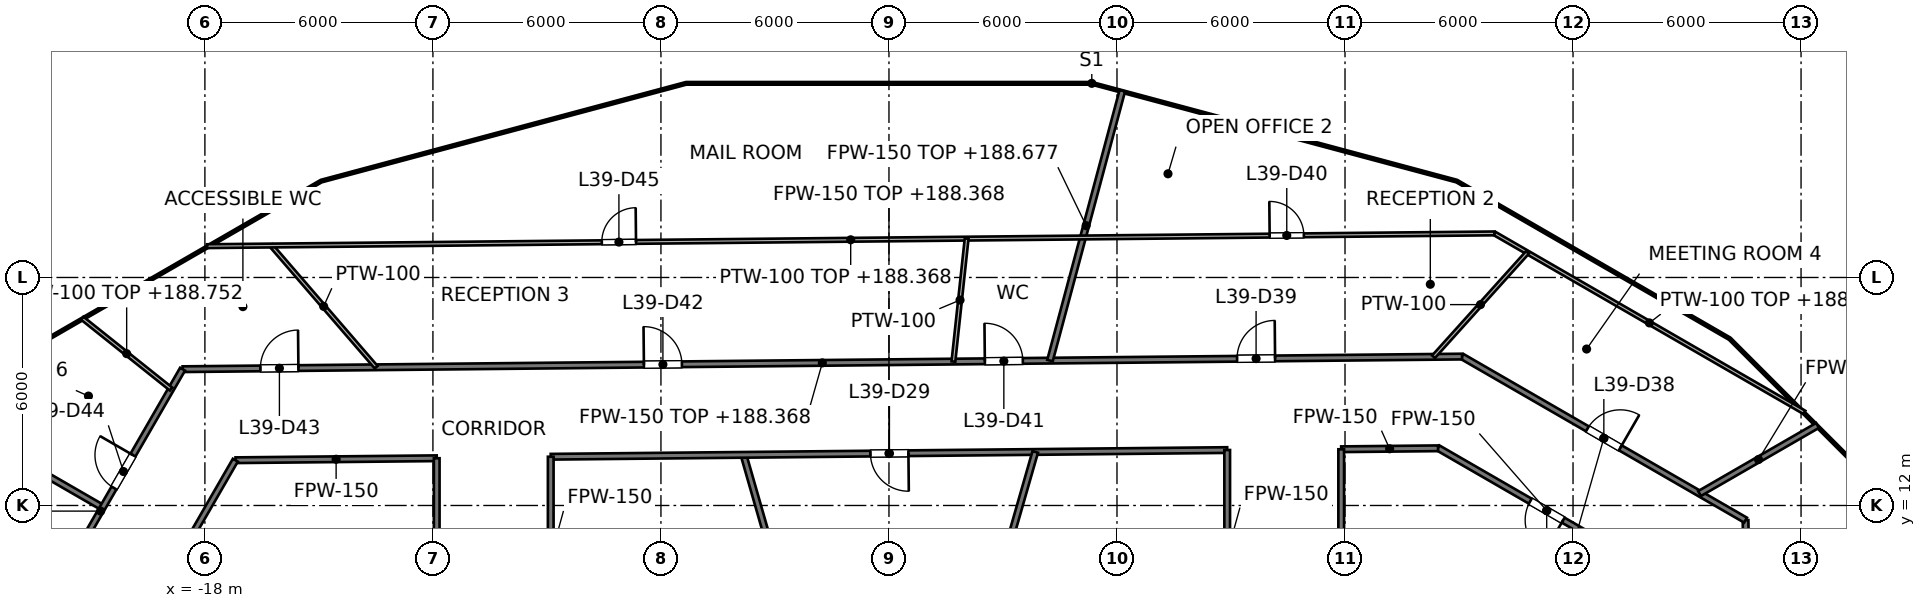
"""IFC4 building model, lengths in metres.
Left out: names, types, materials, properties, quantities, classifications, styles, units other than length and angle.
Written with IfcOpenShell. Run it as: python <this file> out.ifc"""

import sys

from ifc_helpers import new_model, si_unit, direction, frame, frame_2d, origin, place, context, subcontext, project, spatial, rectangle, extrude, element, fill, save


model = new_model("IFC4")
c1 = context("Model", 3, precision=1e-05, world=origin(), true_north=direction((0.0, 1.0)))
c2 = subcontext(c1, "Body", "Model", "MODEL_VIEW")
j1 = project(units=[si_unit("LENGTHUNIT", "METRE"), si_unit("PLANEANGLEUNIT", "RADIAN")], contexts=[c1])
p1 = place(None, origin())
s1 = spatial("IfcSite", under=j1, at=p1, CompositionType="ELEMENT")
p2 = place(p1, origin())
s2 = spatial("IfcBuilding", under=s1, at=p2, CompositionType="ELEMENT")
p3 = place(p2, frame((0.0, 0.0, 185.6)))
s3 = spatial("IfcBuildingStorey", under=s2, at=p3, CompositionType="ELEMENT", Elevation=185.6)
p4 = place(p3, frame((22.539, 11.615, 0.0), z_axis=(0.0, 0.0, 1.0), x_axis=(0.020626332176, -0.99978725458, 0.0)))
e1 = element("IfcWall", 1, at=p4, inside=s3, PredefinedType="PARTITIONING", context=c2, shape_type="SweptSolid", body=[
    extrude(rectangle(XDim=19.66, YDim=0.15, at=frame_2d((9.83, 0.0))), origin(), (0.0, 0.0, 1.0), 2.768),
])
p5 = place(p4, frame((9.33, 0.0, 0.0)))
e2 = element("IfcOpeningElement", 2, at=p5, cuts=e1, PredefinedType="OPENING", context=c2, shape_type="SweptSolid", body=[
    extrude(rectangle(XDim=1.0, YDim=2.1, at=frame_2d((0.5, 1.05))), frame((0.0, 0.075, 0.0), z_axis=(0.0, -1.0, 0.0), x_axis=(1.0, 0.0, 0.0)), (0.0, 0.0, 1.0), 0.15),
])
p6 = place(p3, frame((-3.827, 13.333, 0.0), z_axis=(0.0, 0.0, 1.0), x_axis=(0.275935525478, -0.961176147113, 0.0)))
e3 = element("IfcWall", 3, at=p6, inside=s3, PredefinedType="PARTITIONING", context=c2, shape_type="SweptSolid", body=[
    extrude(rectangle(XDim=5.548, YDim=0.15, at=frame_2d((2.774, 0.0))), origin(), (0.0, 0.0, 1.0), 3.7),
])
p7 = place(p3, frame((-24.433, 14.106, 0.0), z_axis=(0.0, 0.0, 1.0), x_axis=(0.866048255864, -0.499960416948, 0.0)))
e4 = element("IfcWall", 4, at=p7, inside=s3, PredefinedType="PARTITIONING", context=c2, shape_type="SweptSolid", body=[
    extrude(rectangle(XDim=4.322, YDim=0.15, at=frame_2d((2.161, 0.0))), origin(), (0.0, 0.0, 1.0), 2.845),
])
p8 = place(p3, frame((14.448, 13.515, 0.0), z_axis=(0.0, 0.0, 1.0), x_axis=(0.866032288321, -0.499988075443, 0.0)))
e5 = element("IfcWall", 5, at=p8, inside=s3, PredefinedType="PARTITIONING", context=c2, shape_type="SweptSolid", body=[
    extrude(rectangle(XDim=6.604, YDim=0.15, at=frame_2d((3.302, 0.0))), origin(), (0.0, 0.0, 1.0), 2.777),
])
p9 = place(p8, frame((2.802, 0.0, 0.0)))
e6 = element("IfcOpeningElement", 6, at=p9, cuts=e5, PredefinedType="OPENING", context=c2, shape_type="SweptSolid", body=[
    extrude(rectangle(XDim=1.0, YDim=2.1, at=frame_2d((0.5, 1.05))), frame((0.0, 0.075, 0.0), z_axis=(0.0, -1.0, 0.0), x_axis=(1.0, 0.0, 0.0)), (0.0, 0.0, 1.0), 0.15),
])
p10 = place(p3, frame((15.08, 15.921, 0.0), z_axis=(0.0, 0.0, 1.0), x_axis=(0.866020838546, -0.500007907142, 0.0)))
e7 = element("IfcWall", 7, at=p10, inside=s3, PredefinedType="PARTITIONING", context=c2, shape_type="SweptSolid", body=[
    extrude(rectangle(XDim=8.613, YDim=0.15, at=frame_2d((4.306, 0.0))), origin(), (0.0, 0.0, 1.0), 2.777),
])
p11 = place(p10, frame((3.808, 0.0, 0.0)))
e8 = element("IfcOpeningElement", 8, at=p11, cuts=e7, PredefinedType="OPENING", context=c2, shape_type="SweptSolid", body=[
    extrude(rectangle(XDim=1.0, YDim=2.1, at=frame_2d((0.5, 1.05))), frame((0.0, 0.075, 0.0), z_axis=(0.0, -1.0, 0.0), x_axis=(1.0, 0.0, 0.0)), (0.0, 0.0, 1.0), 0.15),
])
p12 = place(p3, frame((-17.194, 13.191, 0.0), z_axis=(0.0, 0.0, 1.0), x_axis=(0.999950853109, 0.009914200296, 0.0)))
e9 = element("IfcWall", 9, at=p12, inside=s3, PredefinedType="PARTITIONING", context=c2, shape_type="SweptSolid", body=[
    extrude(rectangle(XDim=5.294, YDim=0.15, at=frame_2d((2.647, 0.0))), origin(), (0.0, 0.0, 1.0), 2.777),
])
p13 = place(p3, frame((-8.9, 13.282, 0.0), z_axis=(0.0, 0.0, 1.0), x_axis=(0.999951241216, 0.009874977968, 0.0)))
e10 = element("IfcWall", 10, at=p13, inside=s3, PredefinedType="PARTITIONING", context=c2, shape_type="SweptSolid", body=[
    extrude(rectangle(XDim=17.801, YDim=0.15, at=frame_2d((8.9, 0.0))), origin(), (0.0, 0.0, 1.0), 2.768),
])
p14 = place(p13, frame((8.413, 0.0, 0.0)))
e11 = element("IfcOpeningElement", 11, at=p14, cuts=e10, PredefinedType="OPENING", context=c2, shape_type="SweptSolid", body=[
    extrude(rectangle(XDim=1.0, YDim=2.1, at=frame_2d((0.5, 1.05))), frame((0.0, 0.075, 0.0), z_axis=(0.0, -1.0, 0.0), x_axis=(1.0, 0.0, 0.0)), (0.0, 0.0, 1.0), 0.15),
])
p15 = place(p3, frame((11.9, 13.48, 0.0), z_axis=(0.0, 0.0, 1.0), x_axis=(0.999951307579, 0.009868255694, 0.0)))
e12 = element("IfcWall", 12, at=p15, inside=s3, PredefinedType="PARTITIONING", context=c2, shape_type="SweptSolid", body=[
    extrude(rectangle(XDim=2.548, YDim=0.15, at=frame_2d((1.274, 0.0))), origin(), (0.0, 0.0, 1.0), 2.777),
])
p16 = place(p3, frame((-18.587, 15.586, 0.0), z_axis=(0.0, 0.0, 1.0), x_axis=(0.999951300332, 0.009868989991, 0.0)))
e13 = element("IfcWall", 13, at=p16, inside=s3, PredefinedType="PARTITIONING", context=c2, shape_type="SweptSolid", body=[
    extrude(rectangle(XDim=33.669, YDim=0.15, at=frame_2d((16.834, 0.0))), origin(), (0.0, 0.0, 1.0), 2.768),
])
p17 = place(p16, frame((27.749, 0.0, 0.0)))
e14 = element("IfcOpeningElement", 14, at=p17, cuts=e13, PredefinedType="OPENING", context=c2, shape_type="SweptSolid", body=[
    extrude(rectangle(XDim=1.0, YDim=2.1, at=frame_2d((0.5, 1.05))), frame((0.0, 0.075, 0.0), z_axis=(0.0, -1.0, 0.0), x_axis=(1.0, 0.0, 0.0)), (0.0, 0.0, 1.0), 0.15),
])
p18 = place(p16, frame((21.111, 0.0, 0.0)))
e15 = element("IfcOpeningElement", 15, at=p18, cuts=e13, PredefinedType="OPENING", context=c2, shape_type="SweptSolid", body=[
    extrude(rectangle(XDim=1.0, YDim=2.1, at=frame_2d((0.5, 1.05))), frame((0.0, 0.075, 0.0), z_axis=(0.0, -1.0, 0.0), x_axis=(1.0, 0.0, 0.0)), (0.0, 0.0, 1.0), 0.15),
])
p19 = place(p16, frame((12.139, 0.0, 0.0)))
e16 = element("IfcOpeningElement", 16, at=p19, cuts=e13, PredefinedType="OPENING", context=c2, shape_type="SweptSolid", body=[
    extrude(rectangle(XDim=1.0, YDim=2.1, at=frame_2d((0.5, 1.05))), frame((0.0, 0.075, 0.0), z_axis=(0.0, -1.0, 0.0), x_axis=(1.0, 0.0, 0.0)), (0.0, 0.0, 1.0), 0.15),
])
p20 = place(p16, frame((2.048, 0.0, 0.0)))
e17 = element("IfcOpeningElement", 17, at=p20, cuts=e13, PredefinedType="OPENING", context=c2, shape_type="SweptSolid", body=[
    extrude(rectangle(XDim=1.0, YDim=2.1, at=frame_2d((0.5, 1.05))), frame((0.0, 0.075, 0.0), z_axis=(0.0, -1.0, 0.0), x_axis=(1.0, 0.0, 0.0)), (0.0, 0.0, 1.0), 0.15),
])
p21 = place(p3, frame((21.329, 12.314, 0.0), z_axis=(0.0, 0.0, 1.0), x_axis=(0.866038125567, 0.499977964579, 0.0)))
e18 = element("IfcWall", 18, at=p21, inside=s3, PredefinedType="PARTITIONING", context=c2, shape_type="SweptSolid", body=[
    extrude(rectangle(XDim=3.584, YDim=0.15, at=frame_2d((1.792, 0.0))), origin(), (0.0, 0.0, 1.0), 2.845),
])
p22 = place(p3, frame((-20.5, 7.474, 0.0), z_axis=(0.0, 0.0, 1.0), x_axis=(0.499957196903, 0.866050114754, 0.0)))
e19 = element("IfcWall", 19, at=p22, inside=s3, PredefinedType="PARTITIONING", context=c2, shape_type="SweptSolid", body=[
    extrude(rectangle(XDim=6.602, YDim=0.15, at=frame_2d((3.301, 0.0))), origin(), (0.0, 0.0, 1.0), 2.777),
])
p23 = place(p22, frame((2.802, 0.0, 0.0)))
e20 = element("IfcOpeningElement", 20, at=p23, cuts=e19, PredefinedType="OPENING", context=c2, shape_type="SweptSolid", body=[
    extrude(rectangle(XDim=1.0, YDim=2.1, at=frame_2d((0.5, 1.05))), frame((0.0, 0.075, 0.0), z_axis=(0.0, -1.0, 0.0), x_axis=(1.0, 0.0, 0.0)), (0.0, 0.0, 1.0), 0.15),
])
p24 = place(p3, frame((-22.9, 8.117, 0.0), z_axis=(0.0, 0.0, 1.0), x_axis=(0.499950307977, 0.866054091587, 0.0)))
e21 = element("IfcWall", 21, at=p24, inside=s3, PredefinedType="PARTITIONING", context=c2, shape_type="SweptSolid", body=[
    extrude(rectangle(XDim=8.626, YDim=0.15, at=frame_2d((4.313, 0.0))), origin(), (0.0, 0.0, 1.0), 2.777),
])
p25 = place(p24, frame((5.015, 0.0, 0.0)))
e22 = element("IfcOpeningElement", 22, at=p25, cuts=e21, PredefinedType="OPENING", context=c2, shape_type="SweptSolid", body=[
    extrude(rectangle(XDim=1.0, YDim=2.1, at=frame_2d((0.5, 1.05))), frame((0.0, 0.075, 0.0), z_axis=(0.0, -1.0, 0.0), x_axis=(1.0, 0.0, 0.0)), (0.0, 0.0, 1.0), 0.15),
])
p26 = place(p24, frame((2.237, 0.0, 0.0)))
e23 = element("IfcOpeningElement", 23, at=p26, cuts=e21, PredefinedType="OPENING", context=c2, shape_type="SweptSolid", body=[
    extrude(rectangle(XDim=1.0, YDim=2.1, at=frame_2d((0.5, 1.05))), frame((0.0, 0.075, 0.0), z_axis=(0.0, -1.0, 0.0), x_axis=(1.0, 0.0, 0.0)), (0.0, 0.0, 1.0), 0.15),
])
p27 = place(p3, frame((2.296, 8.0, 0.0), z_axis=(0.0, 0.0, 1.0), x_axis=(0.275958345059, 0.961169595749, 0.0)))
e24 = element("IfcWall", 24, at=p27, inside=s3, PredefinedType="PARTITIONING", context=c2, shape_type="SweptSolid", body=[
    extrude(rectangle(XDim=5.628, YDim=0.15, at=frame_2d((2.814, 0.0))), origin(), (0.0, 0.0, 1.0), 3.7),
])
p28 = place(p3, frame((4.237, 15.813, 0.0), z_axis=(0.0, 0.0, 1.0), x_axis=(0.258799155252, 0.965931155539, 0.0)))
e25 = element("IfcWall", 25, at=p28, inside=s3, PredefinedType="PARTITIONING", context=c2, shape_type="SweptSolid", body=[
    extrude(rectangle(XDim=7.353, YDim=0.15, at=frame_2d((3.676, 0.0))), origin(), (0.0, 0.0, 1.0), 3.077),
])
p29 = place(p3, frame((11.9, 8.0, 0.0), z_axis=(0.0, 0.0, 1.0), x_axis=(0.0, 1.0, 0.0)))
e26 = element("IfcWall", 26, at=p29, inside=s3, PredefinedType="PARTITIONING", context=c2, shape_type="SweptSolid", body=[
    extrude(rectangle(XDim=5.479, YDim=0.15, at=frame_2d((2.74, 0.0))), origin(), (0.0, 0.0, 1.0), 2.777),
])
p30 = place(p3, frame((8.9, 8.0, 0.0), z_axis=(0.0, 0.0, 1.0), x_axis=(0.0, 1.0, 0.0)))
e27 = element("IfcWall", 27, at=p30, inside=s3, PredefinedType="PARTITIONING", context=c2, shape_type="SweptSolid", body=[
    extrude(rectangle(XDim=5.46, YDim=0.15, at=frame_2d((2.73, 0.0))), origin(), (0.0, 0.0, 1.0), 2.777),
])
p31 = place(p30, frame((2.23, 0.0, 0.0)))
e28 = element("IfcOpeningElement", 28, at=p31, cuts=e27, PredefinedType="OPENING", context=c2, shape_type="SweptSolid", body=[
    extrude(rectangle(XDim=1.0, YDim=2.1, at=frame_2d((0.5, 1.05))), frame((0.0, 0.075, 0.0), z_axis=(0.0, -1.0, 0.0), x_axis=(1.0, 0.0, 0.0)), (0.0, 0.0, 1.0), 0.15),
])
p32 = place(p3, frame((-8.9, 8.0, 0.0), z_axis=(0.0, 0.0, 1.0), x_axis=(0.0, 1.0, 0.0)))
e29 = element("IfcWall", 29, at=p32, inside=s3, PredefinedType="PARTITIONING", context=c2, shape_type="SweptSolid", body=[
    extrude(rectangle(XDim=5.283, YDim=0.15, at=frame_2d((2.642, 0.0))), origin(), (0.0, 0.0, 1.0), 2.777),
])
p33 = place(p32, frame((2.142, 0.0, 0.0)))
e30 = element("IfcOpeningElement", 30, at=p33, cuts=e29, PredefinedType="OPENING", context=c2, shape_type="SweptSolid", body=[
    extrude(rectangle(XDim=1.0, YDim=2.1, at=frame_2d((0.5, 1.05))), frame((0.0, 0.075, 0.0), z_axis=(0.0, -1.0, 0.0), x_axis=(1.0, 0.0, 0.0)), (0.0, 0.0, 1.0), 0.15),
])
p34 = place(p3, frame((-11.9, 8.0, 0.0), z_axis=(0.0, 0.0, 1.0), x_axis=(0.0, 1.0, 0.0)))
e31 = element("IfcWall", 31, at=p34, inside=s3, PredefinedType="PARTITIONING", context=c2, shape_type="SweptSolid", body=[
    extrude(rectangle(XDim=5.243, YDim=0.15, at=frame_2d((2.622, 0.0))), origin(), (0.0, 0.0, 1.0), 2.777),
])
p35 = place(p3, frame((-16.257, 18.841, 0.0), z_axis=(0.0, 0.0, 1.0), x_axis=(0.653325359449, -0.757077258079, 0.0)))
e32 = element("IfcWall", 32, at=p35, inside=s3, PredefinedType="PARTITIONING", context=c2, shape_type="SweptSolid", body=[
    extrude(rectangle(XDim=4.231, YDim=0.1, at=frame_2d((2.115, 0.0))), origin(), (0.0, 0.0, 1.0), 3.7),
])
p36 = place(p3, frame((-21.228, 16.928, 0.0), z_axis=(0.0, 0.0, 1.0), x_axis=(0.781894831851, -0.623410355966, 0.0)))
e33 = element("IfcWall", 33, at=p36, inside=s3, PredefinedType="PARTITIONING", context=c2, shape_type="SweptSolid", body=[
    extrude(rectangle(XDim=2.992, YDim=0.1, at=frame_2d((1.496, 0.0))), origin(), (0.0, 0.0, 1.0), 3.152),
])
p37 = place(p3, frame((15.931, 19.16, 0.0), z_axis=(0.0, 0.0, 1.0), x_axis=(0.86598056092, -0.500077662076, 0.0)))
e34 = element("IfcWall", 34, at=p37, inside=s3, PredefinedType="PARTITIONING", context=c2, shape_type="SweptSolid", body=[
    extrude(rectangle(XDim=9.42, YDim=0.1, at=frame_2d((4.71, 0.0))), origin(), (0.0, 0.0, 1.0), 2.777),
])
p38 = place(p3, frame((-17.945, 18.824, 0.0), z_axis=(0.0, 0.0, 1.0), x_axis=(0.999950833273, 0.009916200716, 0.0)))
e35 = element("IfcWall", 35, at=p38, inside=s3, PredefinedType="PARTITIONING", context=c2, shape_type="SweptSolid", body=[
    extrude(rectangle(XDim=33.878, YDim=0.1, at=frame_2d((16.939, 0.0))), origin(), (0.0, 0.0, 1.0), 2.768),
])
p39 = place(p38, frame((27.964, 0.0, 0.0)))
e36 = element("IfcOpeningElement", 36, at=p39, cuts=e35, PredefinedType="OPENING", context=c2, shape_type="SweptSolid", body=[
    extrude(rectangle(XDim=0.9, YDim=2.1, at=frame_2d((0.45, 1.05))), frame((0.0, 0.05, 0.0), z_axis=(0.0, -1.0, 0.0), x_axis=(1.0, 0.0, 0.0)), (0.0, 0.0, 1.0), 0.1),
])
p40 = place(p38, frame((10.39, 0.0, 0.0)))
e37 = element("IfcOpeningElement", 37, at=p40, cuts=e35, PredefinedType="OPENING", context=c2, shape_type="SweptSolid", body=[
    extrude(rectangle(XDim=0.9, YDim=2.1, at=frame_2d((0.45, 1.05))), frame((0.0, 0.05, 0.0), z_axis=(0.0, -1.0, 0.0), x_axis=(1.0, 0.0, 0.0)), (0.0, 0.0, 1.0), 0.1),
])
p41 = place(p3, frame((14.329, 15.914, 0.0), z_axis=(0.0, 0.0, 1.0), x_axis=(0.669180226247, 0.74310014453, 0.0)))
e38 = element("IfcWall", 38, at=p41, inside=s3, PredefinedType="PARTITIONING", context=c2, shape_type="SweptSolid", body=[
    extrude(rectangle(XDim=3.692, YDim=0.1, at=frame_2d((1.846, 0.0))), origin(), (0.0, 0.0, 1.0), 3.7),
])
p42 = place(p3, frame((1.696, 15.788, 0.0), z_axis=(0.0, 0.0, 1.0), x_axis=(0.106930547304, 0.994266492472, 0.0)))
e39 = element("IfcWall", 39, at=p42, inside=s3, PredefinedType="PARTITIONING", context=c2, shape_type="SweptSolid", body=[
    extrude(rectangle(XDim=3.253, YDim=0.1, at=frame_2d((1.627, 0.0))), origin(), (0.0, 0.0, 1.0), 3.7),
])
p43 = place(p9, origin())
e40 = element("IfcDoor", 40, at=p43, inside=s3, OperationType="SINGLE_SWING_RIGHT", PredefinedType="DOOR", context=c2, shape_type="SweptSolid", body=[
    extrude(rectangle(XDim=1.0, YDim=2.1, at=frame_2d((0.5, 1.05))), frame((0.0, 0.025, 0.0), z_axis=(0.0, -1.0, 0.0), x_axis=(1.0, 0.0, 0.0)), (0.0, 0.0, 1.0), 0.05),
])
fill(e6, e40)
p44 = place(p14, origin())
e41 = element("IfcDoor", 41, at=p44, inside=s3, OperationType="SINGLE_SWING_RIGHT", PredefinedType="DOOR", context=c2, shape_type="SweptSolid", body=[
    extrude(rectangle(XDim=1.0, YDim=2.1, at=frame_2d((0.5, 1.05))), frame((0.0, 0.025, 0.0), z_axis=(0.0, -1.0, 0.0), x_axis=(1.0, 0.0, 0.0)), (0.0, 0.0, 1.0), 0.05),
])
fill(e11, e41)
p45 = place(p11, origin())
e42 = element("IfcDoor", 42, at=p45, inside=s3, OperationType="SINGLE_SWING_RIGHT", PredefinedType="DOOR", context=c2, shape_type="SweptSolid", body=[
    extrude(rectangle(XDim=1.0, YDim=2.1, at=frame_2d((0.5, 1.05))), frame((0.0, 0.025, 0.0), z_axis=(0.0, -1.0, 0.0), x_axis=(1.0, 0.0, 0.0)), (0.0, 0.0, 1.0), 0.05),
])
fill(e8, e42)
p46 = place(p17, origin())
e43 = element("IfcDoor", 43, at=p46, inside=s3, OperationType="SINGLE_SWING_RIGHT", PredefinedType="DOOR", context=c2, shape_type="SweptSolid", body=[
    extrude(rectangle(XDim=1.0, YDim=2.1, at=frame_2d((0.5, 1.05))), frame((0.0, 0.025, 0.0), z_axis=(0.0, -1.0, 0.0), x_axis=(1.0, 0.0, 0.0)), (0.0, 0.0, 1.0), 0.05),
])
fill(e14, e43)
p47 = place(p39, origin())
e44 = element("IfcDoor", 44, at=p47, inside=s3, OperationType="SINGLE_SWING_LEFT", PredefinedType="DOOR", context=c2, shape_type="SweptSolid", body=[
    extrude(rectangle(XDim=0.9, YDim=2.1, at=frame_2d((0.45, 1.05))), frame((0.0, 0.025, 0.0), z_axis=(0.0, -1.0, 0.0), x_axis=(1.0, 0.0, 0.0)), (0.0, 0.0, 1.0), 0.05),
])
fill(e36, e44)
p48 = place(p18, origin())
e45 = element("IfcDoor", 45, at=p48, inside=s3, OperationType="SINGLE_SWING_LEFT", PredefinedType="DOOR", context=c2, shape_type="SweptSolid", body=[
    extrude(rectangle(XDim=1.0, YDim=2.1, at=frame_2d((0.5, 1.05))), frame((0.0, 0.025, 0.0), z_axis=(0.0, -1.0, 0.0), x_axis=(1.0, 0.0, 0.0)), (0.0, 0.0, 1.0), 0.05),
])
fill(e15, e45)
p49 = place(p19, origin())
e46 = element("IfcDoor", 46, at=p49, inside=s3, OperationType="SINGLE_SWING_LEFT", PredefinedType="DOOR", context=c2, shape_type="SweptSolid", body=[
    extrude(rectangle(XDim=1.0, YDim=2.1, at=frame_2d((0.5, 1.05))), frame((0.0, 0.025, 0.0), z_axis=(0.0, -1.0, 0.0), x_axis=(1.0, 0.0, 0.0)), (0.0, 0.0, 1.0), 0.05),
])
fill(e16, e46)
p50 = place(p20, origin())
e47 = element("IfcDoor", 47, at=p50, inside=s3, OperationType="SINGLE_SWING_RIGHT", PredefinedType="DOOR", context=c2, shape_type="SweptSolid", body=[
    extrude(rectangle(XDim=1.0, YDim=2.1, at=frame_2d((0.5, 1.05))), frame((0.0, 0.025, 0.0), z_axis=(0.0, -1.0, 0.0), x_axis=(1.0, 0.0, 0.0)), (0.0, 0.0, 1.0), 0.05),
])
fill(e17, e47)
p51 = place(p25, origin())
e48 = element("IfcDoor", 48, at=p51, inside=s3, OperationType="SINGLE_SWING_RIGHT", PredefinedType="DOOR", context=c2, shape_type="SweptSolid", body=[
    extrude(rectangle(XDim=1.0, YDim=2.1, at=frame_2d((0.5, 1.05))), frame((0.0, 0.025, 0.0), z_axis=(0.0, -1.0, 0.0), x_axis=(1.0, 0.0, 0.0)), (0.0, 0.0, 1.0), 0.05),
])
fill(e22, e48)
p52 = place(p40, origin())
e49 = element("IfcDoor", 49, at=p52, inside=s3, OperationType="SINGLE_SWING_RIGHT", PredefinedType="DOOR", context=c2, shape_type="SweptSolid", body=[
    extrude(rectangle(XDim=0.9, YDim=2.1, at=frame_2d((0.45, 1.05))), frame((0.0, 0.025, 0.0), z_axis=(0.0, -1.0, 0.0), x_axis=(1.0, 0.0, 0.0)), (0.0, 0.0, 1.0), 0.05),
])
fill(e37, e49)
save(model, sys.argv[1])
